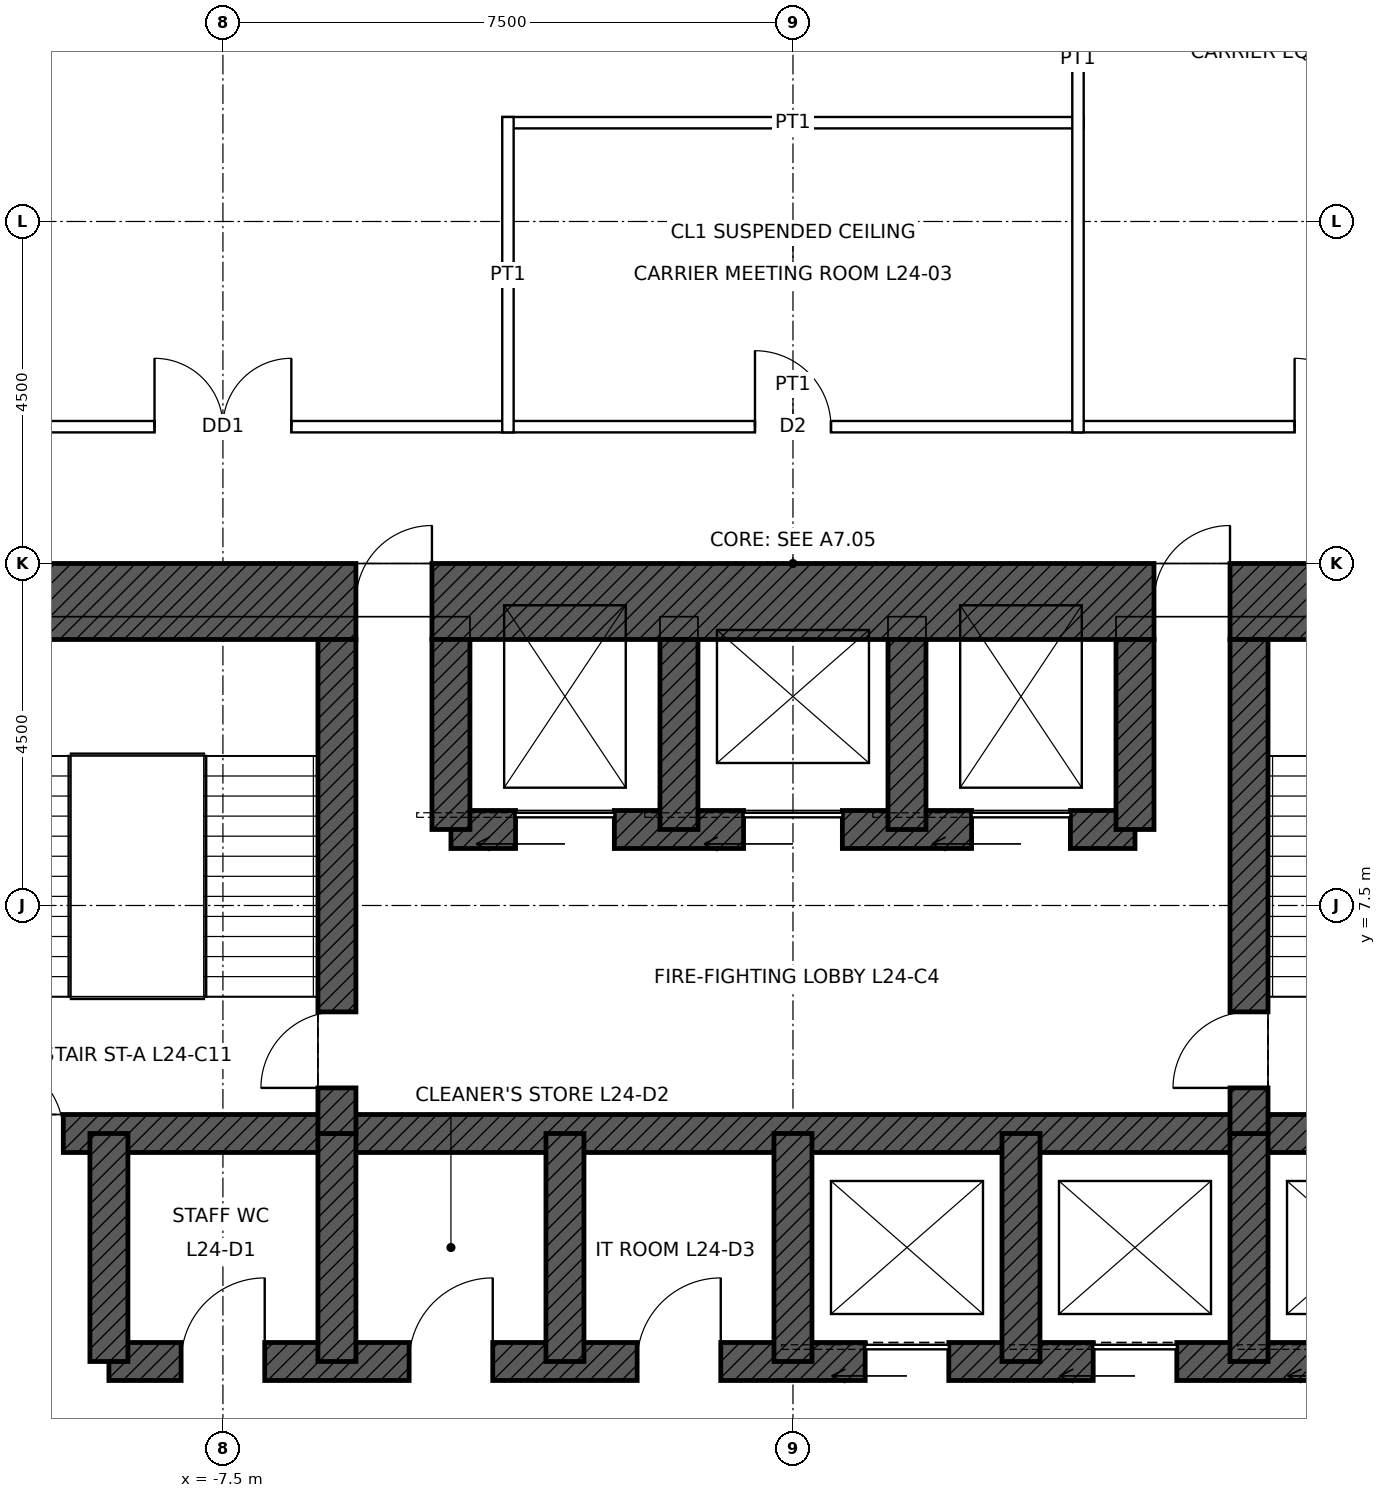
"""IFC4 building model, lengths in metres.
Left out: names, types, materials, properties, quantities, classifications, styles, units other than length and angle.
Written with IfcOpenShell. Run it as: python <this file> out.ifc"""

import sys

from ifc_helpers import new_model, si_unit, direction, frame, frame_2d, origin, place, context, subcontext, project, spatial, rectangle, extrude, element, fill, save


model = new_model("IFC4")
c1 = context("Model", 3, precision=1e-05, world=origin(), true_north=direction((0.0, 1.0)))
c2 = subcontext(c1, "Body", "Model", "MODEL_VIEW")
j1 = project(units=[si_unit("LENGTHUNIT", "METRE"), si_unit("PLANEANGLEUNIT", "RADIAN")], contexts=[c1])
p1 = place(None, origin())
s1 = spatial("IfcSite", under=j1, at=p1, CompositionType="ELEMENT")
p2 = place(p1, origin())
s2 = spatial("IfcBuilding", under=s1, at=p2, CompositionType="ELEMENT")
p3 = place(p2, frame((0.0, 0.0, 122.4)))
s3 = spatial("IfcBuildingStorey", under=s2, at=p3, CompositionType="ELEMENT", Elevation=122.4)
p4 = place(p3, frame((-12.0, 11.5, 0.0), z_axis=(0.0, 0.0, 1.0), x_axis=(1.0, 0.0, 0.0)))
e1 = element("IfcWall", 1, at=p4, inside=s3, PredefinedType="SHEAR", context=c2, shape_type="SweptSolid", body=[
    extrude(rectangle(XDim=24.0, YDim=1.0, at=frame_2d((12.0, 0.0))), origin(), (0.0, 0.0, 1.0), 4.5),
])
p5 = place(p4, frame((6.25, 0.0, 0.0)))
e2 = element("IfcOpeningElement", 2, at=p5, cuts=e1, PredefinedType="OPENING", context=c2, shape_type="SweptSolid", body=[
    extrude(rectangle(XDim=1.0, YDim=2.4, at=frame_2d((0.5, 1.2))), frame((0.0, 0.51, 0.0), z_axis=(0.0, -1.0, 0.0), x_axis=(1.0, 0.0, 0.0)), (0.0, 0.0, 1.0), 1.02),
])
p6 = place(p4, frame((16.75, 0.0, 0.0)))
e3 = element("IfcOpeningElement", 3, at=p6, cuts=e1, PredefinedType="OPENING", context=c2, shape_type="SweptSolid", body=[
    extrude(rectangle(XDim=1.0, YDim=2.4, at=frame_2d((0.5, 1.2))), frame((0.0, 0.51, 0.0), z_axis=(0.0, -1.0, 0.0), x_axis=(1.0, 0.0, 0.0)), (0.0, 0.0, 1.0), 1.02),
])
p7 = place(p3, frame((-11.0, 4.5, 0.0), z_axis=(0.0, 0.0, 1.0), x_axis=(1.0, 0.0, 0.0)))
e4 = element("IfcWall", 4, at=p7, inside=s3, PredefinedType="SHEAR", context=c2, shape_type="SweptSolid", body=[
    extrude(rectangle(XDim=22.0, YDim=0.5, at=frame_2d((11.0, 0.0))), origin(), (0.0, 0.0, 1.0), 4.5),
])
p8 = place(p7, frame((0.4, 0.0, 0.0)))
e5 = element("IfcOpeningElement", 5, at=p8, cuts=e4, PredefinedType="OPENING", context=c2, shape_type="SweptSolid", body=[
    extrude(rectangle(XDim=1.0, YDim=2.1, at=frame_2d((0.5, 1.05))), frame((0.0, 0.26, 0.0), z_axis=(0.0, -1.0, 0.0), x_axis=(1.0, 0.0, 0.0)), (0.0, 0.0, 1.0), 0.52),
])
p9 = place(p7, frame((20.6, 0.0, 0.0)))
e6 = element("IfcOpeningElement", 6, at=p9, cuts=e4, PredefinedType="OPENING", context=c2, shape_type="SweptSolid", body=[
    extrude(rectangle(XDim=1.0, YDim=2.1, at=frame_2d((0.5, 1.05))), frame((0.0, 0.26, 0.0), z_axis=(0.0, -1.0, 0.0), x_axis=(1.0, 0.0, 0.0)), (0.0, 0.0, 1.0), 0.52),
])
p10 = place(p3, frame((-9.0, 1.5, 0.0), z_axis=(0.0, 0.0, 1.0), x_axis=(1.0, 0.0, 0.0)))
e7 = element("IfcWall", 7, at=p10, inside=s3, PredefinedType="SHEAR", context=c2, shape_type="SweptSolid", body=[
    extrude(rectangle(XDim=18.0, YDim=0.5, at=frame_2d((9.0, 0.0))), origin(), (0.0, 0.0, 1.0), 4.5),
])
p11 = place(p10, frame((9.95, 0.0, 0.0)))
e8 = element("IfcOpeningElement", 8, at=p11, cuts=e7, PredefinedType="OPENING", context=c2, shape_type="SweptSolid", body=[
    extrude(rectangle(XDim=1.1, YDim=2.1, at=frame_2d((0.55, 1.05))), frame((0.0, 0.26, 0.0), z_axis=(0.0, -1.0, 0.0), x_axis=(1.0, 0.0, 0.0)), (0.0, 0.0, 1.0), 0.52),
])
p12 = place(p10, frame((12.95, 0.0, 0.0)))
e9 = element("IfcOpeningElement", 9, at=p12, cuts=e7, PredefinedType="OPENING", context=c2, shape_type="SweptSolid", body=[
    extrude(rectangle(XDim=1.1, YDim=2.1, at=frame_2d((0.55, 1.05))), frame((0.0, 0.26, 0.0), z_axis=(0.0, -1.0, 0.0), x_axis=(1.0, 0.0, 0.0)), (0.0, 0.0, 1.0), 0.52),
])
p13 = place(p10, frame((15.95, 0.0, 0.0)))
e10 = element("IfcOpeningElement", 10, at=p13, cuts=e7, PredefinedType="OPENING", context=c2, shape_type="SweptSolid", body=[
    extrude(rectangle(XDim=1.1, YDim=2.1, at=frame_2d((0.55, 1.05))), frame((0.0, 0.26, 0.0), z_axis=(0.0, -1.0, 0.0), x_axis=(1.0, 0.0, 0.0)), (0.0, 0.0, 1.0), 0.52),
])
p14 = place(p10, frame((0.95, 0.0, 0.0)))
e11 = element("IfcOpeningElement", 11, at=p14, cuts=e7, PredefinedType="OPENING", context=c2, shape_type="SweptSolid", body=[
    extrude(rectangle(XDim=1.1, YDim=2.1, at=frame_2d((0.55, 1.05))), frame((0.0, 0.26, 0.0), z_axis=(0.0, -1.0, 0.0), x_axis=(1.0, 0.0, 0.0)), (0.0, 0.0, 1.0), 0.52),
])
p15 = place(p10, frame((3.95, 0.0, 0.0)))
e12 = element("IfcOpeningElement", 12, at=p15, cuts=e7, PredefinedType="OPENING", context=c2, shape_type="SweptSolid", body=[
    extrude(rectangle(XDim=1.1, YDim=2.1, at=frame_2d((0.55, 1.05))), frame((0.0, 0.26, 0.0), z_axis=(0.0, -1.0, 0.0), x_axis=(1.0, 0.0, 0.0)), (0.0, 0.0, 1.0), 0.52),
])
p16 = place(p10, frame((6.95, 0.0, 0.0)))
e13 = element("IfcOpeningElement", 13, at=p16, cuts=e7, PredefinedType="OPENING", context=c2, shape_type="SweptSolid", body=[
    extrude(rectangle(XDim=1.1, YDim=2.1, at=frame_2d((0.55, 1.05))), frame((0.0, 0.26, 0.0), z_axis=(0.0, -1.0, 0.0), x_axis=(1.0, 0.0, 0.0)), (0.0, 0.0, 1.0), 0.52),
])
p17 = place(p3, frame((-4.5, 8.5, 0.0), z_axis=(0.0, 0.0, 1.0), x_axis=(1.0, 0.0, 0.0)))
e14 = element("IfcWall", 14, at=p17, inside=s3, PredefinedType="SHEAR", context=c2, shape_type="SweptSolid", body=[
    extrude(rectangle(XDim=9.0, YDim=0.5, at=frame_2d((4.5, 0.0))), origin(), (0.0, 0.0, 1.0), 4.5),
])
p18 = place(p17, frame((0.85, 0.0, 0.0)))
e15 = element("IfcOpeningElement", 15, at=p18, cuts=e14, PredefinedType="OPENING", context=c2, shape_type="SweptSolid", body=[
    extrude(rectangle(XDim=1.3, YDim=2.4, at=frame_2d((0.65, 1.2))), frame((0.0, 0.26, 0.0), z_axis=(0.0, -1.0, 0.0), x_axis=(1.0, 0.0, 0.0)), (0.0, 0.0, 1.0), 0.52),
])
p19 = place(p17, frame((6.85, 0.0, 0.0)))
e16 = element("IfcOpeningElement", 16, at=p19, cuts=e14, PredefinedType="OPENING", context=c2, shape_type="SweptSolid", body=[
    extrude(rectangle(XDim=1.3, YDim=2.4, at=frame_2d((0.65, 1.2))), frame((0.0, 0.26, 0.0), z_axis=(0.0, -1.0, 0.0), x_axis=(1.0, 0.0, 0.0)), (0.0, 0.0, 1.0), 0.52),
])
p20 = place(p17, frame((3.85, 0.0, 0.0)))
e17 = element("IfcOpeningElement", 17, at=p20, cuts=e14, PredefinedType="OPENING", context=c2, shape_type="SweptSolid", body=[
    extrude(rectangle(XDim=1.3, YDim=2.4, at=frame_2d((0.65, 1.2))), frame((0.0, 0.26, 0.0), z_axis=(0.0, -1.0, 0.0), x_axis=(1.0, 0.0, 0.0)), (0.0, 0.0, 1.0), 0.52),
])
for number, where, z_axis, x_axis in (
    (18, (-9.0, 1.5, 0.0), (0.0, 0.0, 1.0), (0.0, 1.0, 0.0)),
    (19, (-6.0, 1.5, 0.0), (0.0, 0.0, 1.0), (0.0, 1.0, 0.0)),
    (20, (-3.0, 1.5, 0.0), (0.0, 0.0, 1.0), (0.0, 1.0, 0.0)),
    (21, (0.0, 1.5, 0.0), (0.0, 0.0, 1.0), (0.0, 1.0, 0.0)),
    (22, (3.0, 1.5, 0.0), (0.0, 0.0, 1.0), (0.0, 1.0, 0.0)),
    (23, (6.0, 1.5, 0.0), (0.0, 0.0, 1.0), (0.0, 1.0, 0.0)),
):
    element("IfcWall", number, at=place(p3, frame(where, z_axis=z_axis, x_axis=x_axis)), inside=s3, PredefinedType="SHEAR", context=c2, shape_type="SweptSolid", body=[
        extrude(rectangle(XDim=3.0, YDim=0.5, at=frame_2d((1.5, 0.0))), origin(), (0.0, 0.0, 1.0), 4.5),
    ])
p21 = place(p3, frame((-6.0, 4.5, 0.0), z_axis=(0.0, 0.0, 1.0), x_axis=(0.0, 1.0, 0.0)))
e24 = element("IfcWall", 24, at=p21, inside=s3, PredefinedType="SHEAR", context=c2, shape_type="SweptSolid", body=[
    extrude(rectangle(XDim=6.5, YDim=0.5, at=frame_2d((3.25, 0.0))), origin(), (0.0, 0.0, 1.0), 4.5),
])
p22 = place(p21, frame((0.6, 0.0, 0.0)))
e25 = element("IfcOpeningElement", 25, at=p22, cuts=e24, PredefinedType="OPENING", context=c2, shape_type="SweptSolid", body=[
    extrude(rectangle(XDim=1.0, YDim=2.1, at=frame_2d((0.5, 1.05))), frame((0.0, 0.26, 0.0), z_axis=(0.0, -1.0, 0.0), x_axis=(1.0, 0.0, 0.0)), (0.0, 0.0, 1.0), 0.52),
])
p23 = place(p3, frame((6.0, 4.5, 0.0), z_axis=(0.0, 0.0, 1.0), x_axis=(0.0, 1.0, 0.0)))
e26 = element("IfcWall", 26, at=p23, inside=s3, PredefinedType="SHEAR", context=c2, shape_type="SweptSolid", body=[
    extrude(rectangle(XDim=6.5, YDim=0.5, at=frame_2d((3.25, 0.0))), origin(), (0.0, 0.0, 1.0), 4.5),
])
p24 = place(p23, frame((0.6, 0.0, 0.0)))
e27 = element("IfcOpeningElement", 27, at=p24, cuts=e26, PredefinedType="OPENING", context=c2, shape_type="SweptSolid", body=[
    extrude(rectangle(XDim=1.0, YDim=2.1, at=frame_2d((0.5, 1.05))), frame((0.0, 0.26, 0.0), z_axis=(0.0, -1.0, 0.0), x_axis=(1.0, 0.0, 0.0)), (0.0, 0.0, 1.0), 0.52),
])
for number, where, z_axis, x_axis in (
    (28, (-4.5, 8.5, 0.0), (0.0, 0.0, 1.0), (0.0, 1.0, 0.0)),
    (29, (4.5, 8.5, 0.0), (0.0, 0.0, 1.0), (0.0, 1.0, 0.0)),
    (30, (-1.5, 8.5, 0.0), (0.0, 0.0, 1.0), (0.0, 1.0, 0.0)),
    (31, (1.5, 8.5, 0.0), (0.0, 0.0, 1.0), (0.0, 1.0, 0.0)),
):
    element("IfcWall", number, at=place(p3, frame(where, z_axis=z_axis, x_axis=x_axis)), inside=s3, PredefinedType="SHEAR", context=c2, shape_type="SweptSolid", body=[
        extrude(rectangle(XDim=2.5, YDim=0.5, at=frame_2d((1.25, 0.0))), origin(), (0.0, 0.0, 1.0), 4.5),
    ])
p25 = place(p3, frame((-13.875, 13.8, 0.0), z_axis=(0.0, 0.0, 1.0), x_axis=(1.0, 0.0, 0.0)))
e32 = element("IfcWall", 32, at=p25, inside=s3, PredefinedType="PARTITIONING", context=c2, shape_type="SweptSolid", body=[
    extrude(rectangle(XDim=27.75, YDim=0.15, at=frame_2d((13.875, 0.0))), origin(), (0.0, 0.0, 1.0), 4.3),
])
p26 = place(p25, frame((5.475, 0.0, 0.0)))
e33 = element("IfcOpeningElement", 33, at=p26, cuts=e32, PredefinedType="OPENING", context=c2, shape_type="SweptSolid", body=[
    extrude(rectangle(XDim=1.8, YDim=2.4, at=frame_2d((0.9, 1.2))), frame((0.0, 0.085, 0.0), z_axis=(0.0, -1.0, 0.0), x_axis=(1.0, 0.0, 0.0)), (0.0, 0.0, 1.0), 0.17),
])
p27 = place(p25, frame((13.375, 0.0, 0.0)))
e34 = element("IfcOpeningElement", 34, at=p27, cuts=e32, PredefinedType="OPENING", context=c2, shape_type="SweptSolid", body=[
    extrude(rectangle(XDim=1.0, YDim=2.1, at=frame_2d((0.5, 1.05))), frame((0.0, 0.085, 0.0), z_axis=(0.0, -1.0, 0.0), x_axis=(1.0, 0.0, 0.0)), (0.0, 0.0, 1.0), 0.17),
])
p28 = place(p25, frame((20.475, 0.0, 0.0)))
e35 = element("IfcOpeningElement", 35, at=p28, cuts=e32, PredefinedType="OPENING", context=c2, shape_type="SweptSolid", body=[
    extrude(rectangle(XDim=1.8, YDim=2.4, at=frame_2d((0.9, 1.2))), frame((0.0, 0.085, 0.0), z_axis=(0.0, -1.0, 0.0), x_axis=(1.0, 0.0, 0.0)), (0.0, 0.0, 1.0), 0.17),
])
p29 = place(p25, frame((25.9, 0.0, 0.0)))
e36 = element("IfcOpeningElement", 36, at=p29, cuts=e32, PredefinedType="OPENING", context=c2, shape_type="SweptSolid", body=[
    extrude(rectangle(XDim=1.0, YDim=2.1, at=frame_2d((0.5, 1.05))), frame((0.0, 0.085, 0.0), z_axis=(0.0, -1.0, 0.0), x_axis=(1.0, 0.0, 0.0)), (0.0, 0.0, 1.0), 0.17),
])
p30 = place(p25, frame((0.85, 0.0, 0.0)))
e37 = element("IfcOpeningElement", 37, at=p30, cuts=e32, PredefinedType="OPENING", context=c2, shape_type="SweptSolid", body=[
    extrude(rectangle(XDim=1.0, YDim=2.1, at=frame_2d((0.5, 1.05))), frame((0.0, 0.085, 0.0), z_axis=(0.0, -1.0, 0.0), x_axis=(1.0, 0.0, 0.0)), (0.0, 0.0, 1.0), 0.17),
])
p31 = place(p3, frame((-3.825, 17.8, 0.0), z_axis=(0.0, 0.0, 1.0), x_axis=(1.0, 0.0, 0.0)))
e38 = element("IfcWall", 38, at=p31, inside=s3, PredefinedType="PARTITIONING", context=c2, shape_type="SweptSolid", body=[
    extrude(rectangle(XDim=7.65, YDim=0.15, at=frame_2d((3.825, 0.0))), origin(), (0.0, 0.0, 1.0), 4.3),
])
p32 = place(p3, frame((-3.75, 13.725, 0.0), z_axis=(0.0, 0.0, 1.0), x_axis=(0.0, 1.0, 0.0)))
e39 = element("IfcWall", 39, at=p32, inside=s3, PredefinedType="PARTITIONING", context=c2, shape_type="SweptSolid", body=[
    extrude(rectangle(XDim=4.15, YDim=0.15, at=frame_2d((2.075, 0.0))), origin(), (0.0, 0.0, 1.0), 3.431),
])
p33 = place(p3, frame((3.75, 13.725, 0.0), z_axis=(0.0, 0.0, 1.0), x_axis=(0.0, 1.0, 0.0)))
e40 = element("IfcWall", 40, at=p33, inside=s3, PredefinedType="PARTITIONING", context=c2, shape_type="SweptSolid", body=[
    extrude(rectangle(XDim=9.825, YDim=0.15, at=frame_2d((4.913, 0.0))), origin(), (0.0, 0.0, 1.0), 3.431),
])
p34 = place(p8, origin())
e41 = element("IfcDoor", 41, at=p34, inside=s3, OperationType="SINGLE_SWING_LEFT", PredefinedType="DOOR", context=c2, shape_type="SweptSolid", body=[
    extrude(rectangle(XDim=1.0, YDim=2.1, at=frame_2d((0.5, 1.05))), frame((0.0, 0.025, 0.0), z_axis=(0.0, -1.0, 0.0), x_axis=(1.0, 0.0, 0.0)), (0.0, 0.0, 1.0), 0.05),
])
fill(e5, e41)
p35 = place(p22, origin())
e42 = element("IfcDoor", 42, at=p35, inside=s3, OperationType="SINGLE_SWING_LEFT", PredefinedType="DOOR", context=c2, shape_type="SweptSolid", body=[
    extrude(rectangle(XDim=1.0, YDim=2.1, at=frame_2d((0.5, 1.05))), frame((0.0, 0.025, 0.0), z_axis=(0.0, -1.0, 0.0), x_axis=(1.0, 0.0, 0.0)), (0.0, 0.0, 1.0), 0.05),
])
fill(e25, e42)
p36 = place(p24, origin())
e43 = element("IfcDoor", 43, at=p36, inside=s3, OperationType="SINGLE_SWING_LEFT", PredefinedType="DOOR", context=c2, shape_type="SweptSolid", body=[
    extrude(rectangle(XDim=1.0, YDim=2.1, at=frame_2d((0.5, 1.05))), frame((0.0, 0.025, 0.0), z_axis=(0.0, -1.0, 0.0), x_axis=(1.0, 0.0, 0.0)), (0.0, 0.0, 1.0), 0.05),
])
fill(e27, e43)
p37 = place(p5, origin())
e44 = element("IfcDoor", 44, at=p37, inside=s3, OperationType="SINGLE_SWING_RIGHT", PredefinedType="DOOR", context=c2, shape_type="SweptSolid", body=[
    extrude(rectangle(XDim=1.0, YDim=2.4, at=frame_2d((0.5, 1.2))), frame((0.0, 0.485, 0.0), z_axis=(0.0, -1.0, 0.0), x_axis=(1.0, 0.0, 0.0)), (0.0, 0.0, 1.0), 0.05),
])
fill(e2, e44)
p38 = place(p6, origin())
e45 = element("IfcDoor", 45, at=p38, inside=s3, OperationType="SINGLE_SWING_RIGHT", PredefinedType="DOOR", context=c2, shape_type="SweptSolid", body=[
    extrude(rectangle(XDim=1.0, YDim=2.4, at=frame_2d((0.5, 1.2))), frame((0.0, 0.485, 0.0), z_axis=(0.0, -1.0, 0.0), x_axis=(1.0, 0.0, 0.0)), (0.0, 0.0, 1.0), 0.05),
])
fill(e3, e45)
p39 = place(p18, origin())
e46 = element("IfcDoor", 46, at=p39, inside=s3, OperationType="SLIDING_TO_LEFT", PredefinedType="DOOR", context=c2, shape_type="SweptSolid", body=[
    extrude(rectangle(XDim=1.3, YDim=2.4, at=frame_2d((0.65, 1.2))), frame((0.0, 0.025, 0.0), z_axis=(0.0, -1.0, 0.0), x_axis=(1.0, 0.0, 0.0)), (0.0, 0.0, 1.0), 0.05),
])
fill(e15, e46)
p40 = place(p19, origin())
e47 = element("IfcDoor", 47, at=p40, inside=s3, OperationType="SLIDING_TO_LEFT", PredefinedType="DOOR", context=c2, shape_type="SweptSolid", body=[
    extrude(rectangle(XDim=1.3, YDim=2.4, at=frame_2d((0.65, 1.2))), frame((0.0, 0.025, 0.0), z_axis=(0.0, -1.0, 0.0), x_axis=(1.0, 0.0, 0.0)), (0.0, 0.0, 1.0), 0.05),
])
fill(e16, e47)
p41 = place(p20, origin())
e48 = element("IfcDoor", 48, at=p41, inside=s3, OperationType="SLIDING_TO_LEFT", PredefinedType="DOOR", context=c2, shape_type="SweptSolid", body=[
    extrude(rectangle(XDim=1.3, YDim=2.4, at=frame_2d((0.65, 1.2))), frame((0.0, 0.025, 0.0), z_axis=(0.0, -1.0, 0.0), x_axis=(1.0, 0.0, 0.0)), (0.0, 0.0, 1.0), 0.05),
])
fill(e17, e48)
p42 = place(p11, origin())
e49 = element("IfcDoor", 49, at=p42, inside=s3, OperationType="SLIDING_TO_LEFT", PredefinedType="DOOR", context=c2, shape_type="SweptSolid", body=[
    extrude(rectangle(XDim=1.1, YDim=2.1, at=frame_2d((0.55, 1.05))), frame((0.0, 0.025, 0.0), z_axis=(0.0, -1.0, 0.0), x_axis=(1.0, 0.0, 0.0)), (0.0, 0.0, 1.0), 0.05),
])
fill(e8, e49)
p43 = place(p12, origin())
e50 = element("IfcDoor", 50, at=p43, inside=s3, OperationType="SLIDING_TO_LEFT", PredefinedType="DOOR", context=c2, shape_type="SweptSolid", body=[
    extrude(rectangle(XDim=1.1, YDim=2.1, at=frame_2d((0.55, 1.05))), frame((0.0, 0.025, 0.0), z_axis=(0.0, -1.0, 0.0), x_axis=(1.0, 0.0, 0.0)), (0.0, 0.0, 1.0), 0.05),
])
fill(e9, e50)
p44 = place(p14, origin())
e51 = element("IfcDoor", 51, at=p44, inside=s3, OperationType="SINGLE_SWING_RIGHT", PredefinedType="DOOR", context=c2, shape_type="SweptSolid", body=[
    extrude(rectangle(XDim=1.1, YDim=2.1, at=frame_2d((0.55, 1.05))), frame((0.0, 0.025, 0.0), z_axis=(0.0, -1.0, 0.0), x_axis=(1.0, 0.0, 0.0)), (0.0, 0.0, 1.0), 0.05),
])
fill(e11, e51)
p45 = place(p15, origin())
e52 = element("IfcDoor", 52, at=p45, inside=s3, OperationType="SINGLE_SWING_RIGHT", PredefinedType="DOOR", context=c2, shape_type="SweptSolid", body=[
    extrude(rectangle(XDim=1.1, YDim=2.1, at=frame_2d((0.55, 1.05))), frame((0.0, 0.025, 0.0), z_axis=(0.0, -1.0, 0.0), x_axis=(1.0, 0.0, 0.0)), (0.0, 0.0, 1.0), 0.05),
])
fill(e12, e52)
p46 = place(p16, origin())
e53 = element("IfcDoor", 53, at=p46, inside=s3, OperationType="SINGLE_SWING_RIGHT", PredefinedType="DOOR", context=c2, shape_type="SweptSolid", body=[
    extrude(rectangle(XDim=1.1, YDim=2.1, at=frame_2d((0.55, 1.05))), frame((0.0, 0.025, 0.0), z_axis=(0.0, -1.0, 0.0), x_axis=(1.0, 0.0, 0.0)), (0.0, 0.0, 1.0), 0.05),
])
fill(e13, e53)
p47 = place(p26, origin())
e54 = element("IfcDoor", 54, at=p47, inside=s3, OperationType="DOUBLE_DOOR_SINGLE_SWING", PredefinedType="DOOR", context=c2, shape_type="SweptSolid", body=[
    extrude(rectangle(XDim=1.8, YDim=2.4, at=frame_2d((0.9, 1.2))), frame((0.0, 0.025, 0.0), z_axis=(0.0, -1.0, 0.0), x_axis=(1.0, 0.0, 0.0)), (0.0, 0.0, 1.0), 0.05),
])
fill(e33, e54)
p48 = place(p27, origin())
e55 = element("IfcDoor", 55, at=p48, inside=s3, OperationType="SINGLE_SWING_LEFT", PredefinedType="DOOR", context=c2, shape_type="SweptSolid", body=[
    extrude(rectangle(XDim=1.0, YDim=2.1, at=frame_2d((0.5, 1.05))), frame((0.0, 0.025, 0.0), z_axis=(0.0, -1.0, 0.0), x_axis=(1.0, 0.0, 0.0)), (0.0, 0.0, 1.0), 0.05),
])
fill(e34, e55)
p49 = place(p28, origin())
e56 = element("IfcDoor", 56, at=p49, inside=s3, OperationType="DOUBLE_DOOR_SINGLE_SWING", PredefinedType="DOOR", context=c2, shape_type="SweptSolid", body=[
    extrude(rectangle(XDim=1.8, YDim=2.4, at=frame_2d((0.9, 1.2))), frame((0.0, 0.025, 0.0), z_axis=(0.0, -1.0, 0.0), x_axis=(1.0, 0.0, 0.0)), (0.0, 0.0, 1.0), 0.05),
])
fill(e35, e56)
save(model, sys.argv[1])
